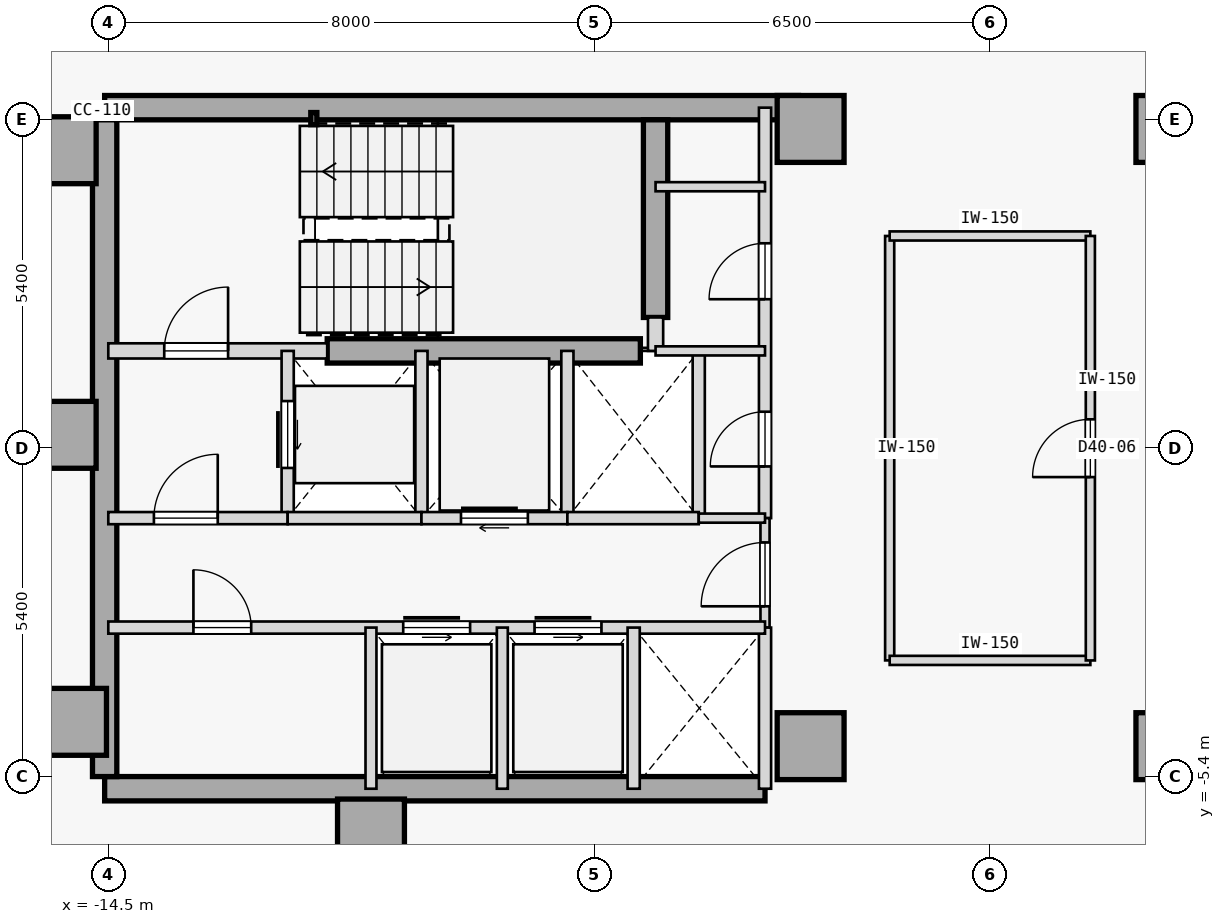
"""IFC4 building model, lengths in metres.
Left out: names, types, materials, properties, quantities, classifications, styles, units other than length and angle.
Written with IfcOpenShell. Run it as: python <this file> out.ifc"""

import sys

from ifc_helpers import new_model, si_unit, direction, frame, frame_2d, origin, origin_2d, place, context, subcontext, project, spatial, rectangle, hollow_rectangle, extrude, element, fill, save


model = new_model("IFC4")
c1 = context("Model", 3, precision=1e-05, world=origin(), true_north=direction((0.0, 1.0)))
c2 = subcontext(c1, "Body", "Model", "MODEL_VIEW")
j1 = project(units=[si_unit("LENGTHUNIT", "METRE"), si_unit("PLANEANGLEUNIT", "RADIAN")], contexts=[c1])
p1 = place(None, origin())
s1 = spatial("IfcSite", under=j1, at=p1, CompositionType="ELEMENT")
p2 = place(p1, origin())
s2 = spatial("IfcBuilding", under=s1, at=p2, CompositionType="ELEMENT")
p3 = place(p2, frame((0.0, 0.0, 158.2)))
s3 = spatial("IfcBuildingStorey", under=s2, at=p3, CompositionType="ELEMENT", Elevation=158.2)
for number, where, z_axis, x_axis in (
    (1, (-15.25, 4.9, 0.0), (0.0, 0.0, 1.0), (1.0, 0.0, 0.0)),
    (2, (-15.25, 0.22, 0.0), (0.0, 0.0, 1.0), (1.0, 0.0, 0.0)),
    (3, (-15.08, -4.5, 0.0), (0.0, 0.0, 1.0), (1.0, 0.0, 0.0)),
    (4, (-10.18, -6.32, 0.0), (0.0, 0.0, 1.0), (1.0, 0.0, 0.0)),
    (5, (-2.95, -4.9, 0.0), (0.0, 0.0, 1.0), (1.0, 0.0, 0.0)),
    (6, (-2.95, 5.25, 0.0), (0.0, 0.0, 1.0), (1.0, 0.0, 0.0)),
    (7, (2.95, -4.9, 0.0), (0.0, 0.0, 1.0), (1.0, 0.0, 0.0)),
    (8, (2.95, 5.25, 0.0), (0.0, 0.0, 1.0), (1.0, 0.0, 0.0)),
):
    element("IfcColumn", number, at=place(p3, frame(where, z_axis=z_axis, x_axis=x_axis)), inside=s3, PredefinedType="COLUMN", context=c2, shape_type="SweptSolid", body=[
        extrude(rectangle(XDim=1.1, YDim=1.1, at=origin_2d()), origin(), (0.0, 0.0, 1.0), 3.4),
    ])
p4 = place(p3, frame((-14.56, 5.6, 0.0), z_axis=(0.0, 0.0, 1.0), x_axis=(1.0, 0.0, 0.0)))
e9 = element("IfcWall", 9, at=p4, inside=s3, PredefinedType="SHEAR", context=c2, shape_type="SweptSolid", body=[
    extrude(rectangle(XDim=11.41, YDim=0.4, at=frame_2d((5.705, 0.0))), origin(), (0.0, 0.0, 1.0), 3.175),
])
p5 = place(p3, frame((-14.56, -5.6, 0.0), z_axis=(0.0, 0.0, 1.0), x_axis=(1.0, 0.0, 0.0)))
e10 = element("IfcWall", 10, at=p5, inside=s3, PredefinedType="SHEAR", context=c2, shape_type="SweptSolid", body=[
    extrude(rectangle(XDim=10.86, YDim=0.4, at=frame_2d((5.43, 0.0))), origin(), (0.0, 0.0, 1.0), 3.175),
])
p6 = place(p3, frame((-14.56, -5.4, 0.0), z_axis=(0.0, 0.0, 1.0), x_axis=(0.0, 1.0, 0.0)))
e11 = element("IfcWall", 11, at=p6, inside=s3, PredefinedType="SHEAR", context=c2, shape_type="SweptSolid", body=[
    extrude(rectangle(XDim=10.8, YDim=0.4, at=frame_2d((5.4, 0.0))), origin(), (0.0, 0.0, 1.0), 3.175),
])
p7 = place(p3, frame((-5.5, 2.15, 0.0), z_axis=(0.0, 0.0, 1.0), x_axis=(0.0, 1.0, 0.0)))
e12 = element("IfcWall", 12, at=p7, inside=s3, PredefinedType="SHEAR", context=c2, shape_type="SweptSolid", body=[
    extrude(rectangle(XDim=3.25, YDim=0.4, at=frame_2d((1.625, 0.0))), origin(), (0.0, 0.0, 1.0), 3.175),
])
p8 = place(p3, frame((-10.9, 1.6, 0.0), z_axis=(0.0, 0.0, 1.0), x_axis=(1.0, 0.0, 0.0)))
e13 = element("IfcWall", 13, at=p8, inside=s3, PredefinedType="SHEAR", context=c2, shape_type="SweptSolid", body=[
    extrude(rectangle(XDim=5.15, YDim=0.4, at=frame_2d((2.575, 0.0))), origin(), (0.0, 0.0, 1.0), 3.175),
])
p9 = place(p3, frame((-11.12, 5.42, 0.0), z_axis=(0.0, 0.0, 1.0), x_axis=(1.0, 0.0, 0.0)))
e14 = element("IfcColumn", 14, at=p9, inside=s3, PredefinedType="COLUMN", context=c2, shape_type="SweptSolid", body=[
    extrude(hollow_rectangle(XDim=0.1, YDim=0.2, WallThickness=0.008, at=origin_2d()), origin(), (0.0, 0.0, 1.0), 3.4),
])
p10 = place(p3, frame((-14.5, 1.6, 0.0), z_axis=(0.0, 0.0, 1.0), x_axis=(1.0, 0.0, 0.0)))
e15 = element("IfcWall", 15, at=p10, inside=s3, PredefinedType="STANDARD", context=c2, shape_type="SweptSolid", body=[
    extrude(rectangle(XDim=3.6, YDim=0.25, at=frame_2d((1.8, 0.0))), origin(), (0.0, 0.0, 1.0), 3.175),
])
p11 = place(p10, frame((0.92, 0.0, 0.0)))
e16 = element("IfcOpeningElement", 16, at=p11, cuts=e15, PredefinedType="OPENING", context=c2, shape_type="SweptSolid", body=[
    extrude(rectangle(XDim=1.05, YDim=2.15, at=frame_2d((0.525, 1.075))), frame((0.0, 0.135, 0.0), z_axis=(0.0, -1.0, 0.0), x_axis=(1.0, 0.0, 0.0)), (0.0, 0.0, 1.0), 0.27),
])
p12 = place(p3, frame((-5.5, 1.6, 0.0), z_axis=(0.0, 0.0, 1.0), x_axis=(0.0, 1.0, 0.0)))
e17 = element("IfcWall", 17, at=p12, inside=s3, PredefinedType="STANDARD", context=c2, shape_type="SweptSolid", body=[
    extrude(rectangle(XDim=0.55, YDim=0.25, at=frame_2d((0.275, 0.0))), origin(), (0.0, 0.0, 1.0), 3.175),
])
p13 = place(p3, frame((-3.7, -1.15, 0.0), z_axis=(0.0, 0.0, 1.0), x_axis=(0.0, 1.0, 0.0)))
e18 = element("IfcWall", 18, at=p13, inside=s3, PredefinedType="STANDARD", context=c2, shape_type="SweptSolid", body=[
    extrude(rectangle(XDim=6.75, YDim=0.2, at=frame_2d((3.375, 0.0))), origin(), (0.0, 0.0, 1.0), 3.175),
])
p14 = place(p13, frame((3.6, 0.0, 0.0)))
e19 = element("IfcOpeningElement", 19, at=p14, cuts=e18, PredefinedType="OPENING", context=c2, shape_type="SweptSolid", body=[
    extrude(rectangle(XDim=0.92, YDim=2.15, at=frame_2d((0.46, 1.075))), frame((0.0, 0.11, 0.0), z_axis=(0.0, -1.0, 0.0), x_axis=(1.0, 0.0, 0.0)), (0.0, 0.0, 1.0), 0.22),
])
p15 = place(p13, frame((0.85, 0.0, 0.0)))
e20 = element("IfcOpeningElement", 20, at=p15, cuts=e18, PredefinedType="OPENING", context=c2, shape_type="SweptSolid", body=[
    extrude(rectangle(XDim=0.9, YDim=2.15, at=frame_2d((0.45, 1.075))), frame((0.0, 0.11, 0.0), z_axis=(0.0, -1.0, 0.0), x_axis=(1.0, 0.0, 0.0)), (0.0, 0.0, 1.0), 0.22),
])
p16 = place(p3, frame((-3.7, -2.95, 0.0), z_axis=(0.0, 0.0, 1.0), x_axis=(0.0, 1.0, 0.0)))
e21 = element("IfcWall", 21, at=p16, inside=s3, PredefinedType="PARTITIONING", context=c2, shape_type="SweptSolid", body=[
    extrude(rectangle(XDim=1.8, YDim=0.15, at=frame_2d((0.9, 0.0))), origin(), (0.0, 0.0, 1.0), 3.175),
])
p17 = place(p16, frame((0.35, 0.0, 0.0)))
e22 = element("IfcOpeningElement", 22, at=p17, cuts=e21, PredefinedType="OPENING", context=c2, shape_type="SweptSolid", body=[
    extrude(rectangle(XDim=1.05, YDim=2.18, at=frame_2d((0.525, 1.09))), frame((0.0, 0.085, 0.0), z_axis=(0.0, -1.0, 0.0), x_axis=(1.0, 0.0, 0.0)), (0.0, 0.0, 1.0), 0.17),
])
p18 = place(p3, frame((-3.7, -5.6, 0.0), z_axis=(0.0, 0.0, 1.0), x_axis=(0.0, 1.0, 0.0)))
e23 = element("IfcWall", 23, at=p18, inside=s3, PredefinedType="STANDARD", context=c2, shape_type="SweptSolid", body=[
    extrude(rectangle(XDim=2.65, YDim=0.2, at=frame_2d((1.325, 0.0))), origin(), (0.0, 0.0, 1.0), 3.175),
])
p19 = place(p3, frame((-11.55, -1.15, 0.0), z_axis=(0.0, 0.0, 1.0), x_axis=(0.0, 1.0, 0.0)))
e24 = element("IfcWall", 24, at=p19, inside=s3, PredefinedType="STANDARD", context=c2, shape_type="SweptSolid", body=[
    extrude(rectangle(XDim=2.75, YDim=0.2, at=frame_2d((1.375, 0.0))), origin(), (0.0, 0.0, 1.0), 3.175),
])
p20 = place(p19, frame((0.825, 0.0, 0.0)))
e25 = element("IfcOpeningElement", 25, at=p20, cuts=e24, PredefinedType="OPENING", context=c2, shape_type="SweptSolid", body=[
    extrude(rectangle(XDim=1.1, YDim=2.15, at=frame_2d((0.55, 1.075))), frame((0.0, 0.11, 0.0), z_axis=(0.0, -1.0, 0.0), x_axis=(1.0, 0.0, 0.0)), (0.0, 0.0, 1.0), 0.22),
])
p21 = place(p3, frame((-9.35, -1.15, 0.0), z_axis=(0.0, 0.0, 1.0), x_axis=(0.0, 1.0, 0.0)))
e26 = element("IfcWall", 26, at=p21, inside=s3, PredefinedType="STANDARD", context=c2, shape_type="SweptSolid", body=[
    extrude(rectangle(XDim=2.75, YDim=0.2, at=frame_2d((1.375, 0.0))), origin(), (0.0, 0.0, 1.0), 3.175),
])
p22 = place(p3, frame((-14.5, -1.15, 0.0), z_axis=(0.0, 0.0, 1.0), x_axis=(1.0, 0.0, 0.0)))
e27 = element("IfcWall", 27, at=p22, inside=s3, PredefinedType="STANDARD", context=c2, shape_type="SweptSolid", body=[
    extrude(rectangle(XDim=2.95, YDim=0.2, at=frame_2d((1.475, 0.0))), origin(), (0.0, 0.0, 1.0), 3.175),
])
p23 = place(p22, frame((0.75, 0.0, 0.0)))
e28 = element("IfcOpeningElement", 28, at=p23, cuts=e27, PredefinedType="OPENING", context=c2, shape_type="SweptSolid", body=[
    extrude(rectangle(XDim=1.05, YDim=2.18, at=frame_2d((0.525, 1.09))), frame((0.0, 0.11, 0.0), z_axis=(0.0, -1.0, 0.0), x_axis=(1.0, 0.0, 0.0)), (0.0, 0.0, 1.0), 0.22),
])
p24 = place(p3, frame((-11.55, -1.15, 0.0), z_axis=(0.0, 0.0, 1.0), x_axis=(1.0, 0.0, 0.0)))
e29 = element("IfcWall", 29, at=p24, inside=s3, PredefinedType="STANDARD", context=c2, shape_type="SweptSolid", body=[
    extrude(rectangle(XDim=2.2, YDim=0.2, at=frame_2d((1.1, 0.0))), origin(), (0.0, 0.0, 1.0), 3.175),
])
p25 = place(p3, frame((-6.95, -1.15, 0.0), z_axis=(0.0, 0.0, 1.0), x_axis=(0.0, 1.0, 0.0)))
e30 = element("IfcWall", 30, at=p25, inside=s3, PredefinedType="STANDARD", context=c2, shape_type="SweptSolid", body=[
    extrude(rectangle(XDim=2.75, YDim=0.2, at=frame_2d((1.375, 0.0))), origin(), (0.0, 0.0, 1.0), 3.175),
])
p26 = place(p3, frame((-9.35, -1.15, 0.0), z_axis=(0.0, 0.0, 1.0), x_axis=(1.0, 0.0, 0.0)))
e31 = element("IfcWall", 31, at=p26, inside=s3, PredefinedType="STANDARD", context=c2, shape_type="SweptSolid", body=[
    extrude(rectangle(XDim=2.4, YDim=0.2, at=frame_2d((1.2, 0.0))), origin(), (0.0, 0.0, 1.0), 3.175),
])
p27 = place(p26, frame((0.65, 0.0, 0.0)))
e32 = element("IfcOpeningElement", 32, at=p27, cuts=e31, PredefinedType="OPENING", context=c2, shape_type="SweptSolid", body=[
    extrude(rectangle(XDim=1.1, YDim=2.15, at=frame_2d((0.55, 1.075))), frame((0.0, 0.11, 0.0), z_axis=(0.0, -1.0, 0.0), x_axis=(1.0, 0.0, 0.0)), (0.0, 0.0, 1.0), 0.22),
])
p28 = place(p3, frame((-4.79, -1.15, 0.0), z_axis=(0.0, 0.0, 1.0), x_axis=(0.0, 1.0, 0.0)))
e33 = element("IfcWall", 33, at=p28, inside=s3, PredefinedType="STANDARD", context=c2, shape_type="SweptSolid", body=[
    extrude(rectangle(XDim=2.75, YDim=0.2, at=frame_2d((1.375, 0.0))), origin(), (0.0, 0.0, 1.0), 3.175),
])
p29 = place(p3, frame((-6.95, -1.15, 0.0), z_axis=(0.0, 0.0, 1.0), x_axis=(1.0, 0.0, 0.0)))
e34 = element("IfcWall", 34, at=p29, inside=s3, PredefinedType="STANDARD", context=c2, shape_type="SweptSolid", body=[
    extrude(rectangle(XDim=2.16, YDim=0.2, at=frame_2d((1.08, 0.0))), origin(), (0.0, 0.0, 1.0), 3.175),
])
p30 = place(p3, frame((-4.79, -1.15, 0.0), z_axis=(0.0, 0.0, 1.0), x_axis=(1.0, 0.0, 0.0)))
e35 = element("IfcWall", 35, at=p30, inside=s3, PredefinedType="PARTITIONING", context=c2, shape_type="SweptSolid", body=[
    extrude(rectangle(XDim=1.09, YDim=0.15, at=frame_2d((0.545, 0.0))), origin(), (0.0, 0.0, 1.0), 3.175),
])
p31 = place(p3, frame((-14.5, -2.95, 0.0), z_axis=(0.0, 0.0, 1.0), x_axis=(1.0, 0.0, 0.0)))
e36 = element("IfcWall", 36, at=p31, inside=s3, PredefinedType="STANDARD", context=c2, shape_type="SweptSolid", body=[
    extrude(rectangle(XDim=10.8, YDim=0.2, at=frame_2d((5.4, 0.0))), origin(), (0.0, 0.0, 1.0), 3.175),
])
p32 = place(p31, frame((4.85, 0.0, 0.0)))
e37 = element("IfcOpeningElement", 37, at=p32, cuts=e36, PredefinedType="OPENING", context=c2, shape_type="SweptSolid", body=[
    extrude(rectangle(XDim=1.1, YDim=2.15, at=frame_2d((0.55, 1.075))), frame((0.0, 0.11, 0.0), z_axis=(0.0, -1.0, 0.0), x_axis=(1.0, 0.0, 0.0)), (0.0, 0.0, 1.0), 0.22),
])
p33 = place(p31, frame((7.01, 0.0, 0.0)))
e38 = element("IfcOpeningElement", 38, at=p33, cuts=e36, PredefinedType="OPENING", context=c2, shape_type="SweptSolid", body=[
    extrude(rectangle(XDim=1.1, YDim=2.15, at=frame_2d((0.55, 1.075))), frame((0.0, 0.11, 0.0), z_axis=(0.0, -1.0, 0.0), x_axis=(1.0, 0.0, 0.0)), (0.0, 0.0, 1.0), 0.22),
])
p34 = place(p31, frame((1.4, 0.0, 0.0)))
e39 = element("IfcOpeningElement", 39, at=p34, cuts=e36, PredefinedType="OPENING", context=c2, shape_type="SweptSolid", body=[
    extrude(rectangle(XDim=0.95, YDim=2.15, at=frame_2d((0.475, 1.075))), frame((0.0, 0.11, 0.0), z_axis=(0.0, -1.0, 0.0), x_axis=(1.0, 0.0, 0.0)), (0.0, 0.0, 1.0), 0.22),
])
p35 = place(p3, frame((-5.86, -5.6, 0.0), z_axis=(0.0, 0.0, 1.0), x_axis=(0.0, 1.0, 0.0)))
e40 = element("IfcWall", 40, at=p35, inside=s3, PredefinedType="STANDARD", context=c2, shape_type="SweptSolid", body=[
    extrude(rectangle(XDim=2.65, YDim=0.2, at=frame_2d((1.325, 0.0))), origin(), (0.0, 0.0, 1.0), 3.175),
])
for number, where, z_axis, x_axis in (
    (41, (-10.18, -5.6, 0.0), (0.0, 0.0, 1.0), (0.0, 1.0, 0.0)),
    (42, (-8.02, -5.6, 0.0), (0.0, 0.0, 1.0), (0.0, 1.0, 0.0)),
):
    element("IfcWall", number, at=place(p3, frame(where, z_axis=z_axis, x_axis=x_axis)), inside=s3, PredefinedType="STANDARD", context=c2, shape_type="SweptSolid", body=[
        extrude(rectangle(XDim=2.65, YDim=0.18, at=frame_2d((1.325, 0.0))), origin(), (0.0, 0.0, 1.0), 3.175),
    ])
for number, where, z_axis, x_axis in (
    (43, (-5.5, 4.3, 0.0), (0.0, 0.0, 1.0), (1.0, 0.0, 0.0)),
    (44, (-5.5, 1.6, 0.0), (0.0, 0.0, 1.0), (1.0, 0.0, 0.0)),
):
    element("IfcWall", number, at=place(p3, frame(where, z_axis=z_axis, x_axis=x_axis)), inside=s3, PredefinedType="PARTITIONING", context=c2, shape_type="SweptSolid", body=[
        extrude(rectangle(XDim=1.8, YDim=0.15, at=frame_2d((0.9, 0.0))), origin(), (0.0, 0.0, 1.0), 3.175),
    ])
p36 = place(p3, frame((-1.65, -3.49, 0.0), z_axis=(0.0, 0.0, 1.0), x_axis=(-3.4979712e-05, 0.999999999388, 0.0)))
e45 = element("IfcWall", 45, at=p36, inside=s3, PredefinedType="PARTITIONING", context=c2, shape_type="SweptSolid", body=[
    extrude(rectangle(XDim=6.979, YDim=0.15, at=frame_2d((3.49, 0.0))), origin(), (0.0, 0.0, 1.0), 3.175),
])
p37 = place(p3, frame((-1.65, -3.49, 0.0), z_axis=(0.0, 0.0, 1.0), x_axis=(0.999999975374, -0.000221926315, 0.0)))
e46 = element("IfcWall", 46, at=p37, inside=s3, PredefinedType="PARTITIONING", context=c2, shape_type="SweptSolid", body=[
    extrude(rectangle(XDim=3.3, YDim=0.15, at=frame_2d((1.65, 0.0))), origin(), (0.0, 0.0, 1.0), 3.175),
])
p38 = place(p3, frame((-1.65, 3.49, 0.0), z_axis=(0.0, 0.0, 1.0), x_axis=(1.0, 0.0, 0.0)))
e47 = element("IfcWall", 47, at=p38, inside=s3, PredefinedType="PARTITIONING", context=c2, shape_type="SweptSolid", body=[
    extrude(rectangle(XDim=3.3, YDim=0.15, at=frame_2d((1.65, 0.0))), origin(), (0.0, 0.0, 1.0), 3.175),
])
p39 = place(p3, frame((1.65, -3.49, 0.0), z_axis=(0.0, 0.0, 1.0), x_axis=(-6.9952083e-05, 0.999999997553, 0.0)))
e48 = element("IfcWall", 48, at=p39, inside=s3, PredefinedType="PARTITIONING", context=c2, shape_type="SweptSolid", body=[
    extrude(rectangle(XDim=6.98, YDim=0.15, at=frame_2d((3.49, 0.0))), origin(), (0.0, 0.0, 1.0), 3.175),
])
p40 = place(p39, frame((3.015, 0.0, 0.0)))
e49 = element("IfcOpeningElement", 49, at=p40, cuts=e48, PredefinedType="OPENING", context=c2, shape_type="SweptSolid", body=[
    extrude(rectangle(XDim=0.95, YDim=2.15, at=frame_2d((0.475, 1.075))), frame((0.0, 0.085, 0.0), z_axis=(0.0, -1.0, 0.0), x_axis=(1.0, 0.0, 0.0)), (0.0, 0.0, 1.0), 0.17),
])
p41 = place(p11, origin())
e50 = element("IfcDoor", 50, at=p41, inside=s3, OperationType="SINGLE_SWING_RIGHT", PredefinedType="DOOR", context=c2, shape_type="SweptSolid", body=[
    extrude(rectangle(XDim=1.05, YDim=2.15, at=frame_2d((0.525, 1.075))), frame((0.0, 0.025, 0.0), z_axis=(0.0, -1.0, 0.0), x_axis=(1.0, 0.0, 0.0)), (0.0, 0.0, 1.0), 0.05),
])
fill(e16, e50)
p42 = place(p23, origin())
e51 = element("IfcDoor", 51, at=p42, inside=s3, OperationType="SINGLE_SWING_RIGHT", PredefinedType="DOOR", context=c2, shape_type="SweptSolid", body=[
    extrude(rectangle(XDim=1.05, YDim=2.18, at=frame_2d((0.525, 1.09))), frame((0.0, 0.025, 0.0), z_axis=(0.0, -1.0, 0.0), x_axis=(1.0, 0.0, 0.0)), (0.0, 0.0, 1.0), 0.05),
])
fill(e28, e51)
p43 = place(p17, origin())
e52 = element("IfcDoor", 52, at=p43, inside=s3, OperationType="SINGLE_SWING_LEFT", PredefinedType="DOOR", context=c2, shape_type="SweptSolid", body=[
    extrude(rectangle(XDim=1.05, YDim=2.18, at=frame_2d((0.525, 1.09))), frame((0.0, 0.025, 0.0), z_axis=(0.0, -1.0, 0.0), x_axis=(1.0, 0.0, 0.0)), (0.0, 0.0, 1.0), 0.05),
])
fill(e22, e52)
p44 = place(p20, origin())
e53 = element("IfcDoor", 53, at=p44, inside=s3, OperationType="SLIDING_TO_RIGHT", PredefinedType="DOOR", context=c2, shape_type="SweptSolid", body=[
    extrude(rectangle(XDim=1.1, YDim=2.15, at=frame_2d((0.55, 1.075))), frame((0.0, 0.025, 0.0), z_axis=(0.0, -1.0, 0.0), x_axis=(1.0, 0.0, 0.0)), (0.0, 0.0, 1.0), 0.05),
])
fill(e25, e53)
p45 = place(p27, origin())
e54 = element("IfcDoor", 54, at=p45, inside=s3, OperationType="SLIDING_TO_RIGHT", PredefinedType="DOOR", context=c2, shape_type="SweptSolid", body=[
    extrude(rectangle(XDim=1.1, YDim=2.15, at=frame_2d((0.55, 1.075))), frame((0.0, 0.025, 0.0), z_axis=(0.0, -1.0, 0.0), x_axis=(1.0, 0.0, 0.0)), (0.0, 0.0, 1.0), 0.05),
])
fill(e32, e54)
p46 = place(p32, origin())
e55 = element("IfcDoor", 55, at=p46, inside=s3, OperationType="SLIDING_TO_LEFT", PredefinedType="DOOR", context=c2, shape_type="SweptSolid", body=[
    extrude(rectangle(XDim=1.1, YDim=2.15, at=frame_2d((0.55, 1.075))), frame((0.0, 0.025, 0.0), z_axis=(0.0, -1.0, 0.0), x_axis=(1.0, 0.0, 0.0)), (0.0, 0.0, 1.0), 0.05),
])
fill(e37, e55)
p47 = place(p33, origin())
e56 = element("IfcDoor", 56, at=p47, inside=s3, OperationType="SLIDING_TO_LEFT", PredefinedType="DOOR", context=c2, shape_type="SweptSolid", body=[
    extrude(rectangle(XDim=1.1, YDim=2.15, at=frame_2d((0.55, 1.075))), frame((0.0, 0.025, 0.0), z_axis=(0.0, -1.0, 0.0), x_axis=(1.0, 0.0, 0.0)), (0.0, 0.0, 1.0), 0.05),
])
fill(e38, e56)
p48 = place(p34, origin())
e57 = element("IfcDoor", 57, at=p48, inside=s3, OperationType="SINGLE_SWING_LEFT", PredefinedType="DOOR", context=c2, shape_type="SweptSolid", body=[
    extrude(rectangle(XDim=0.95, YDim=2.15, at=frame_2d((0.475, 1.075))), frame((0.0, 0.025, 0.0), z_axis=(0.0, -1.0, 0.0), x_axis=(1.0, 0.0, 0.0)), (0.0, 0.0, 1.0), 0.05),
])
fill(e39, e57)
p49 = place(p14, origin())
e58 = element("IfcDoor", 58, at=p49, inside=s3, OperationType="SINGLE_SWING_LEFT", PredefinedType="DOOR", context=c2, shape_type="SweptSolid", body=[
    extrude(rectangle(XDim=0.92, YDim=2.15, at=frame_2d((0.46, 1.075))), frame((0.0, 0.025, 0.0), z_axis=(0.0, -1.0, 0.0), x_axis=(1.0, 0.0, 0.0)), (0.0, 0.0, 1.0), 0.05),
])
fill(e19, e58)
p50 = place(p15, origin())
e59 = element("IfcDoor", 59, at=p50, inside=s3, OperationType="SINGLE_SWING_LEFT", PredefinedType="DOOR", context=c2, shape_type="SweptSolid", body=[
    extrude(rectangle(XDim=0.9, YDim=2.15, at=frame_2d((0.45, 1.075))), frame((0.0, 0.025, 0.0), z_axis=(0.0, -1.0, 0.0), x_axis=(1.0, 0.0, 0.0)), (0.0, 0.0, 1.0), 0.05),
])
fill(e20, e59)
p51 = place(p40, origin())
e60 = element("IfcDoor", 60, at=p51, inside=s3, OperationType="SINGLE_SWING_LEFT", PredefinedType="DOOR", context=c2, shape_type="SweptSolid", body=[
    extrude(rectangle(XDim=0.95, YDim=2.15, at=frame_2d((0.475, 1.075))), frame((0.0, 0.025, 0.0), z_axis=(0.0, -1.0, 0.0), x_axis=(1.0, 0.0, 0.0)), (0.0, 0.0, 1.0), 0.05),
])
fill(e49, e60)
save(model, sys.argv[1])
